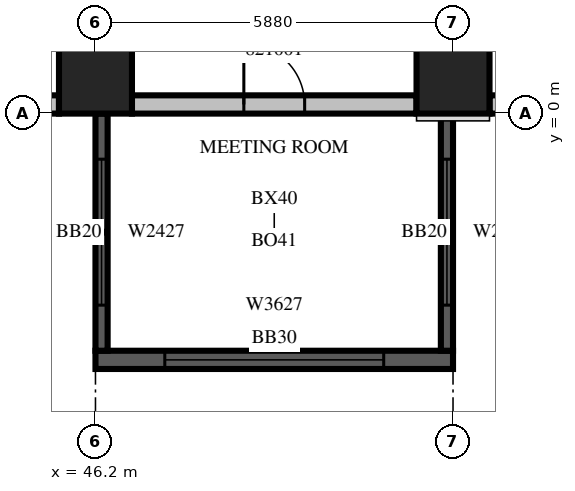
"""IFC4 building model, lengths in metres.
Left out: names, types, materials, properties, quantities, classifications, styles, units other than length and angle.
Written with IfcOpenShell. Run it as: python <this file> out.ifc"""

import sys

from ifc_helpers import new_model, si_unit, direction, frame, frame_2d, origin, origin_2d, place, context, subcontext, project, spatial, rectangle, extrude, source, transform, mapped, element, fill, save


model = new_model("IFC4")
c1 = context("Model", 3, precision=1e-05, world=origin(), true_north=direction((0.0, 1.0)))
c2 = subcontext(c1, "Body", "Model", "MODEL_VIEW")
j1 = project(units=[si_unit("LENGTHUNIT", "METRE"), si_unit("PLANEANGLEUNIT", "RADIAN")], contexts=[c1])
p1 = place(None, origin())
s1 = spatial("IfcSite", under=j1, at=p1, CompositionType="ELEMENT")
p2 = place(p1, origin())
s2 = spatial("IfcBuilding", under=s1, at=p2, CompositionType="ELEMENT")
p3 = place(p2, frame((0.0, 0.0, 99.3)))
s3 = spatial("IfcBuildingStorey", under=s2, at=p3, CompositionType="ELEMENT", Elevation=99.3)
m1 = source(origin(), c2, "Body", "SweptSolid", [
    extrude(rectangle(XDim=1.2, YDim=1.2, at=origin_2d()), origin(), (0.0, 0.0, 1.0), 4.2),
])
for number, where, z_axis, x_axis in (
    (1, (46.2, 0.6, 0.0), (0.0, 0.0, 1.0), (1.0, 0.0, 0.0)),
    (2, (52.08, 0.6, 0.0), (0.0, 0.0, 1.0), (1.0, 0.0, 0.0)),
):
    element("IfcColumn", number, at=place(p3, frame(where, z_axis=z_axis, x_axis=x_axis)), inside=s3, PredefinedType="COLUMN", context=c2, shape_type="MappedRepresentation", body=[
        mapped(m1, transform((0.0, 0.0, 0.0), scale=1.0)),
    ])
m2 = source(origin(), c2, "Body", "SweptSolid", [
    extrude(rectangle(XDim=5.88, YDim=0.3, at=frame_2d((2.94, 0.0))), origin(), (0.0, 0.0, 1.0), 3.8),
])
p4 = place(p3, frame((46.2, -4.05, 0.0), z_axis=(0.0, 0.0, 1.0), x_axis=(1.0, 0.0, 0.0)))
e3 = element("IfcWall", 3, at=p4, inside=s3, PredefinedType="SOLIDWALL", context=c2, shape_type="MappedRepresentation", body=[
    mapped(m2, transform((0.0, 0.0, 0.0), scale=1.0)),
])
m3 = source(origin(), c2, "Body", "SweptSolid", [
    extrude(rectangle(XDim=3.6, YDim=2.7, at=frame_2d((1.8, 1.35))), frame((0.0, 0.16, 0.0), z_axis=(0.0, -1.0, 0.0), x_axis=(1.0, 0.0, 0.0)), (0.0, 0.0, 1.0), 0.32),
])
p5 = place(p4, frame((1.14, 0.0, 0.6)))
e4 = element("IfcOpeningElement", 4, at=p5, cuts=e3, PredefinedType="OPENING", context=c2, shape_type="MappedRepresentation", body=[
    mapped(m3, transform((0.0, 0.0, 0.0), scale=1.0)),
])
m4 = source(origin(), c2, "Body", "SweptSolid", [
    extrude(rectangle(XDim=3.9, YDim=0.2, at=frame_2d((1.95, 0.0))), origin(), (0.0, 0.0, 1.0), 3.8),
])
p6 = place(p3, frame((46.3, 0.0, 0.0), z_axis=(0.0, 0.0, 1.0), x_axis=(0.0, -1.0, 0.0)))
e5 = element("IfcWall", 5, at=p6, inside=s3, PredefinedType="SOLIDWALL", context=c2, shape_type="MappedRepresentation", body=[
    mapped(m4, transform((0.0, 0.0, 0.0), scale=1.0)),
])
m5 = source(origin(), c2, "Body", "SweptSolid", [
    extrude(rectangle(XDim=2.4, YDim=2.7, at=frame_2d((1.2, 1.35))), frame((0.0, 0.11, 0.0), z_axis=(0.0, -1.0, 0.0), x_axis=(1.0, 0.0, 0.0)), (0.0, 0.0, 1.0), 0.22),
])
p7 = place(p6, frame((0.75, 0.0, 0.6)))
e6 = element("IfcOpeningElement", 6, at=p7, cuts=e5, PredefinedType="OPENING", context=c2, shape_type="MappedRepresentation", body=[
    mapped(m5, transform((0.0, 0.0, 0.0), scale=1.0)),
])
p8 = place(p3, frame((51.98, 0.0, 0.0), z_axis=(0.0, 0.0, 1.0), x_axis=(0.0, -1.0, 0.0)))
e7 = element("IfcWall", 7, at=p8, inside=s3, PredefinedType="SOLIDWALL", context=c2, shape_type="MappedRepresentation", body=[
    mapped(m4, transform((0.0, 0.0, 0.0), scale=1.0)),
])
p9 = place(p8, frame((0.75, 0.0, 0.6)))
e8 = element("IfcOpeningElement", 8, at=p9, cuts=e7, PredefinedType="OPENING", context=c2, shape_type="MappedRepresentation", body=[
    mapped(m5, transform((0.0, 0.0, 0.0), scale=1.0)),
])
m6 = source(origin(), c2, "Body", "SweptSolid", [
    extrude(rectangle(XDim=1.6, YDim=0.3, at=frame_2d((0.8, 0.0))), origin(), (0.0, 0.0, 1.0), 3.8),
])
p10 = place(p3, frame((44.0, 0.15, 0.0), z_axis=(0.0, 0.0, 1.0), x_axis=(1.0, 0.0, 0.0)))
e9 = element("IfcWall", 9, at=p10, inside=s3, PredefinedType="STANDARD", context=c2, shape_type="MappedRepresentation", body=[
    mapped(m6, transform((0.0, 0.0, 0.0), scale=1.0)),
])
m7 = source(origin(), c2, "Body", "SweptSolid", [
    extrude(rectangle(XDim=0.9, YDim=2.7, at=frame_2d((0.45, 1.35))), frame((0.0, 0.16, 0.0), z_axis=(0.0, -1.0, 0.0), x_axis=(1.0, 0.0, 0.0)), (0.0, 0.0, 1.0), 0.32),
])
p11 = place(p10, frame((0.35, 0.0, 0.6)))
e10 = element("IfcOpeningElement", 10, at=p11, cuts=e9, PredefinedType="OPENING", context=c2, shape_type="MappedRepresentation", body=[
    mapped(m7, transform((0.0, 0.0, 0.0), scale=1.0)),
])
m8 = source(origin(), c2, "Body", "SweptSolid", [
    extrude(rectangle(XDim=4.68, YDim=0.3, at=frame_2d((2.34, 0.0))), origin(), (0.0, 0.0, 1.0), 3.8),
])
p12 = place(p3, frame((46.8, 0.15, 0.0), z_axis=(0.0, 0.0, 1.0), x_axis=(1.0, 0.0, 0.0)))
e11 = element("IfcWall", 11, at=p12, inside=s3, PredefinedType="STANDARD", context=c2, shape_type="MappedRepresentation", body=[
    mapped(m8, transform((0.0, 0.0, 0.0), scale=1.0)),
])
m9 = source(origin(), c2, "Body", "SweptSolid", [
    extrude(rectangle(XDim=1.0, YDim=2.1, at=frame_2d((0.5, 1.05))), frame((0.0, 0.16, 0.0), z_axis=(0.0, -1.0, 0.0), x_axis=(1.0, 0.0, 0.0)), (0.0, 0.0, 1.0), 0.32),
])
p13 = place(p12, frame((1.84, 0.0, 0.0)))
e12 = element("IfcOpeningElement", 12, at=p13, cuts=e11, PredefinedType="OPENING", context=c2, shape_type="MappedRepresentation", body=[
    mapped(m9, transform((0.0, 0.0, 0.0), scale=1.0)),
])
p14 = place(p3, frame((52.68, 0.15, 0.0), z_axis=(0.0, 0.0, 1.0), x_axis=(1.0, 0.0, 0.0)))
e13 = element("IfcWall", 13, at=p14, inside=s3, PredefinedType="STANDARD", context=c2, shape_type="MappedRepresentation", body=[
    mapped(m8, transform((0.0, 0.0, 0.0), scale=1.0)),
])
p15 = place(p14, frame((0.54, 0.0, 0.6)))
e14 = element("IfcOpeningElement", 14, at=p15, cuts=e13, PredefinedType="OPENING", context=c2, shape_type="MappedRepresentation", body=[
    mapped(m3, transform((0.0, 0.0, 0.0), scale=1.0)),
])
m10 = source(origin(), c2, "Body", "SweptSolid", [
    extrude(rectangle(XDim=3.6, YDim=2.7, at=frame_2d((1.8, 1.35))), frame((0.0, 0.03, 0.0), z_axis=(0.0, -1.0, 0.0), x_axis=(1.0, 0.0, 0.0)), (0.0, 0.0, 1.0), 0.06),
])
p16 = place(p5, origin())
e15 = element("IfcWindow", 15, at=p16, inside=s3, PartitioningType="SINGLE_PANEL", PredefinedType="WINDOW", context=c2, shape_type="MappedRepresentation", body=[
    mapped(m10, transform((0.0, 0.0, 0.0), scale=1.0)),
])
fill(e4, e15)
m11 = source(origin(), c2, "Body", "SweptSolid", [
    extrude(rectangle(XDim=2.4, YDim=2.7, at=frame_2d((1.2, 1.35))), frame((0.0, 0.03, 0.0), z_axis=(0.0, -1.0, 0.0), x_axis=(1.0, 0.0, 0.0)), (0.0, 0.0, 1.0), 0.06),
])
p17 = place(p7, origin())
e16 = element("IfcWindow", 16, at=p17, inside=s3, PartitioningType="SINGLE_PANEL", PredefinedType="WINDOW", context=c2, shape_type="MappedRepresentation", body=[
    mapped(m11, transform((0.0, 0.0, 0.0), scale=1.0)),
])
fill(e6, e16)
p18 = place(p9, origin())
e17 = element("IfcWindow", 17, at=p18, inside=s3, PartitioningType="SINGLE_PANEL", PredefinedType="WINDOW", context=c2, shape_type="MappedRepresentation", body=[
    mapped(m11, transform((0.0, 0.0, 0.0), scale=1.0)),
])
fill(e8, e17)
m12 = source(origin(), c2, "Body", "SweptSolid", [
    extrude(rectangle(XDim=1.0, YDim=2.1, at=frame_2d((0.5, 1.05))), frame((0.0, 0.025, 0.0), z_axis=(0.0, -1.0, 0.0), x_axis=(1.0, 0.0, 0.0)), (0.0, 0.0, 1.0), 0.05),
])
p19 = place(p13, origin())
e18 = element("IfcDoor", 18, at=p19, inside=s3, OperationType="SINGLE_SWING_LEFT", PredefinedType="DOOR", context=c2, shape_type="MappedRepresentation", body=[
    mapped(m12, transform((0.0, 0.0, 0.0), scale=1.0)),
])
fill(e12, e18)
save(model, sys.argv[1])
